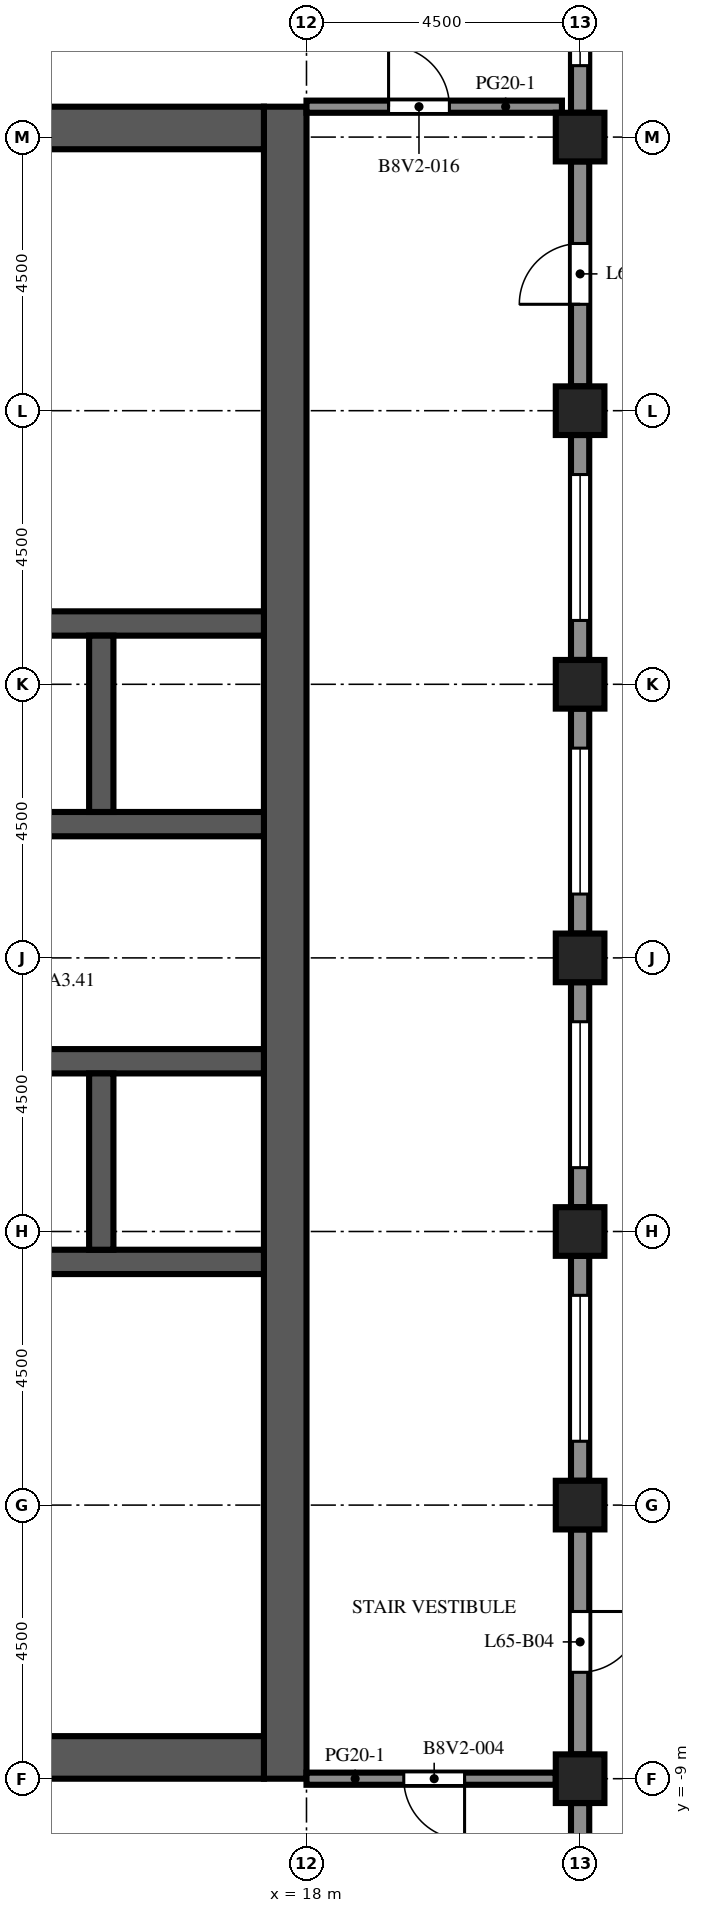
"""IFC4 building model, lengths in metres.
Left out: names, types, materials, properties, quantities, classifications, styles, units other than length and angle.
Written with IfcOpenShell. Run it as: python <this file> out.ifc"""

import sys

from ifc_helpers import new_model, si_unit, direction, frame, frame_2d, origin, origin_2d, place, context, subcontext, project, spatial, rectangle, extrude, element, fill, save


model = new_model("IFC4")
c1 = context("Model", 3, precision=1e-05, world=origin(), true_north=direction((0.0, 1.0)))
c2 = subcontext(c1, "Body", "Model", "MODEL_VIEW")
j1 = project(units=[si_unit("LENGTHUNIT", "METRE"), si_unit("PLANEANGLEUNIT", "RADIAN")], contexts=[c1])
p1 = place(None, origin())
s1 = spatial("IfcSite", under=j1, at=p1, CompositionType="ELEMENT")
p2 = place(p1, origin())
s2 = spatial("IfcBuilding", under=s1, at=p2, CompositionType="ELEMENT")
p3 = place(p2, frame((0.0, 0.0, 286.8)))
s3 = spatial("IfcBuildingStorey", under=s2, at=p3, CompositionType="ELEMENT", Elevation=286.8)
for number, where, z_axis, x_axis in (
    (1, (22.5, -9.0, 0.0), (0.0, 0.0, 1.0), (1.0, 0.0, 0.0)),
    (2, (22.5, -4.5, 0.0), (0.0, 0.0, 1.0), (1.0, 0.0, 0.0)),
    (3, (22.5, 0.0, 0.0), (0.0, 0.0, 1.0), (1.0, 0.0, 0.0)),
    (4, (22.5, 4.5, 0.0), (0.0, 0.0, 1.0), (1.0, 0.0, 0.0)),
    (5, (22.5, 9.0, 0.0), (0.0, 0.0, 1.0), (1.0, 0.0, 0.0)),
    (6, (22.5, 13.5, 0.0), (0.0, 0.0, 1.0), (1.0, 0.0, 0.0)),
    (7, (22.5, 18.0, 0.0), (0.0, 0.0, 1.0), (1.0, 0.0, 0.0)),
):
    element("IfcColumn", number, at=place(p3, frame(where, z_axis=z_axis, x_axis=x_axis)), inside=s3, PredefinedType="COLUMN", context=c2, shape_type="SweptSolid", body=[
        extrude(rectangle(XDim=0.8, YDim=0.8, at=origin_2d()), origin(), (0.0, 0.0, 1.0), 4.1),
    ])
p4 = place(p3, frame((17.65, -9.0, 0.0), z_axis=(0.0, 0.0, 1.0), x_axis=(0.0, 1.0, 0.0)))
e8 = element("IfcWall", 8, at=p4, inside=s3, PredefinedType="SHEAR", context=c2, shape_type="SweptSolid", body=[
    extrude(rectangle(XDim=27.5, YDim=0.7, at=frame_2d((13.75, 0.0))), origin(), (0.0, 0.0, 1.0), 4.1),
])
p5 = place(p4, frame((12.55, 0.0, 0.0)))
e9 = element("IfcOpeningElement", 9, at=p5, cuts=e8, PredefinedType="OPENING", context=c2, shape_type="SweptSolid", body=[
    extrude(rectangle(XDim=2.4, YDim=2.4, at=frame_2d((1.2, 1.2))), frame((0.0, 0.36, 0.0), z_axis=(0.0, -1.0, 0.0), x_axis=(1.0, 0.0, 0.0)), (0.0, 0.0, 1.0), 0.72),
])
p6 = place(p4, frame((6.825, 0.0, 0.0)))
e10 = element("IfcOpeningElement", 10, at=p6, cuts=e8, PredefinedType="OPENING", context=c2, shape_type="SweptSolid", body=[
    extrude(rectangle(XDim=1.2, YDim=2.1, at=frame_2d((0.6, 1.05))), frame((0.0, 0.36, 0.0), z_axis=(0.0, -1.0, 0.0), x_axis=(1.0, 0.0, 0.0)), (0.0, 0.0, 1.0), 0.72),
])
p7 = place(p4, frame((19.475, 0.0, 0.0)))
e11 = element("IfcOpeningElement", 11, at=p7, cuts=e8, PredefinedType="OPENING", context=c2, shape_type="SweptSolid", body=[
    extrude(rectangle(XDim=1.2, YDim=2.1, at=frame_2d((0.6, 1.05))), frame((0.0, 0.36, 0.0), z_axis=(0.0, -1.0, 0.0), x_axis=(1.0, 0.0, 0.0)), (0.0, 0.0, 1.0), 0.72),
])
for number, where, z_axis, x_axis in (
    (12, (6.7, -8.65, 0.0), (0.0, 0.0, 1.0), (1.0, 0.0, 0.0)),
    (13, (6.7, 18.15, 0.0), (0.0, 0.0, 1.0), (1.0, 0.0, 0.0)),
):
    element("IfcWall", number, at=place(p3, frame(where, z_axis=z_axis, x_axis=x_axis)), inside=s3, PredefinedType="SHEAR", context=c2, shape_type="SweptSolid", body=[
        extrude(rectangle(XDim=10.6, YDim=0.7, at=frame_2d((5.3, 0.0))), origin(), (0.0, 0.0, 1.0), 4.1),
    ])
p8 = place(p3, frame((6.7, -0.5, 0.0), z_axis=(0.0, 0.0, 1.0), x_axis=(1.0, 0.0, 0.0)))
e14 = element("IfcWall", 14, at=p8, inside=s3, PredefinedType="SHEAR", context=c2, shape_type="SweptSolid", body=[
    extrude(rectangle(XDim=10.6, YDim=0.4, at=frame_2d((5.3, 0.0))), origin(), (0.0, 0.0, 1.0), 4.1),
])
p9 = place(p3, frame((6.7, 2.8, 0.0), z_axis=(0.0, 0.0, 1.0), x_axis=(1.0, 0.0, 0.0)))
e15 = element("IfcWall", 15, at=p9, inside=s3, PredefinedType="SHEAR", context=c2, shape_type="SweptSolid", body=[
    extrude(rectangle(XDim=10.6, YDim=0.4, at=frame_2d((5.3, 0.0))), origin(), (0.0, 0.0, 1.0), 4.1),
])
p10 = place(p9, frame((0.688, 0.0, 0.0)))
e16 = element("IfcOpeningElement", 16, at=p10, cuts=e15, PredefinedType="OPENING", context=c2, shape_type="SweptSolid", body=[
    extrude(rectangle(XDim=1.1, YDim=2.1, at=frame_2d((0.55, 1.05))), frame((0.0, 0.21, 0.0), z_axis=(0.0, -1.0, 0.0), x_axis=(1.0, 0.0, 0.0)), (0.0, 0.0, 1.0), 0.42),
])
p11 = place(p9, frame((3.438, 0.0, 0.0)))
e17 = element("IfcOpeningElement", 17, at=p11, cuts=e15, PredefinedType="OPENING", context=c2, shape_type="SweptSolid", body=[
    extrude(rectangle(XDim=1.1, YDim=2.1, at=frame_2d((0.55, 1.05))), frame((0.0, 0.21, 0.0), z_axis=(0.0, -1.0, 0.0), x_axis=(1.0, 0.0, 0.0)), (0.0, 0.0, 1.0), 0.42),
])
p12 = place(p9, frame((6.113, 0.0, 0.0)))
e18 = element("IfcOpeningElement", 18, at=p12, cuts=e15, PredefinedType="OPENING", context=c2, shape_type="SweptSolid", body=[
    extrude(rectangle(XDim=1.0, YDim=2.1, at=frame_2d((0.5, 1.05))), frame((0.0, 0.21, 0.0), z_axis=(0.0, -1.0, 0.0), x_axis=(1.0, 0.0, 0.0)), (0.0, 0.0, 1.0), 0.42),
])
p13 = place(p9, frame((8.863, 0.0, 0.0)))
e19 = element("IfcOpeningElement", 19, at=p13, cuts=e15, PredefinedType="OPENING", context=c2, shape_type="SweptSolid", body=[
    extrude(rectangle(XDim=1.0, YDim=2.1, at=frame_2d((0.5, 1.05))), frame((0.0, 0.21, 0.0), z_axis=(0.0, -1.0, 0.0), x_axis=(1.0, 0.0, 0.0)), (0.0, 0.0, 1.0), 0.42),
])
p14 = place(p3, frame((6.7, 6.7, 0.0), z_axis=(0.0, 0.0, 1.0), x_axis=(1.0, 0.0, 0.0)))
e20 = element("IfcWall", 20, at=p14, inside=s3, PredefinedType="SHEAR", context=c2, shape_type="SweptSolid", body=[
    extrude(rectangle(XDim=10.6, YDim=0.4, at=frame_2d((5.3, 0.0))), origin(), (0.0, 0.0, 1.0), 4.1),
])
p15 = place(p14, frame((3.438, 0.0, 0.0)))
e21 = element("IfcOpeningElement", 21, at=p15, cuts=e20, PredefinedType="OPENING", context=c2, shape_type="SweptSolid", body=[
    extrude(rectangle(XDim=1.1, YDim=2.1, at=frame_2d((0.55, 1.05))), frame((0.0, 0.21, 0.0), z_axis=(0.0, -1.0, 0.0), x_axis=(1.0, 0.0, 0.0)), (0.0, 0.0, 1.0), 0.42),
])
p16 = place(p14, frame((6.062, 0.0, 0.0)))
e22 = element("IfcOpeningElement", 22, at=p16, cuts=e20, PredefinedType="OPENING", context=c2, shape_type="SweptSolid", body=[
    extrude(rectangle(XDim=1.1, YDim=2.1, at=frame_2d((0.55, 1.05))), frame((0.0, 0.21, 0.0), z_axis=(0.0, -1.0, 0.0), x_axis=(1.0, 0.0, 0.0)), (0.0, 0.0, 1.0), 0.42),
])
p17 = place(p14, frame((8.812, 0.0, 0.0)))
e23 = element("IfcOpeningElement", 23, at=p17, cuts=e20, PredefinedType="OPENING", context=c2, shape_type="SweptSolid", body=[
    extrude(rectangle(XDim=1.1, YDim=2.1, at=frame_2d((0.55, 1.05))), frame((0.0, 0.21, 0.0), z_axis=(0.0, -1.0, 0.0), x_axis=(1.0, 0.0, 0.0)), (0.0, 0.0, 1.0), 0.42),
])
p18 = place(p14, frame((0.738, 0.0, 0.0)))
e24 = element("IfcOpeningElement", 24, at=p18, cuts=e20, PredefinedType="OPENING", context=c2, shape_type="SweptSolid", body=[
    extrude(rectangle(XDim=1.0, YDim=2.1, at=frame_2d((0.5, 1.05))), frame((0.0, 0.21, 0.0), z_axis=(0.0, -1.0, 0.0), x_axis=(1.0, 0.0, 0.0)), (0.0, 0.0, 1.0), 0.42),
])
p19 = place(p3, frame((6.7, 10.0, 0.0), z_axis=(0.0, 0.0, 1.0), x_axis=(1.0, 0.0, 0.0)))
e25 = element("IfcWall", 25, at=p19, inside=s3, PredefinedType="SHEAR", context=c2, shape_type="SweptSolid", body=[
    extrude(rectangle(XDim=10.6, YDim=0.4, at=frame_2d((5.3, 0.0))), origin(), (0.0, 0.0, 1.0), 4.1),
])
for number, where, z_axis, x_axis in (
    (26, (14.625, -0.3, 0.0), (0.0, 0.0, 1.0), (0.0, 1.0, 0.0)),
    (27, (14.625, 6.9, 0.0), (0.0, 0.0, 1.0), (0.0, 1.0, 0.0)),
):
    element("IfcWall", number, at=place(p3, frame(where, z_axis=z_axis, x_axis=x_axis)), inside=s3, PredefinedType="SHEAR", context=c2, shape_type="SweptSolid", body=[
        extrude(rectangle(XDim=2.9, YDim=0.4, at=frame_2d((1.45, 0.0))), origin(), (0.0, 0.0, 1.0), 4.1),
    ])
p20 = place(p3, frame((22.5, -9.4, 0.0), z_axis=(0.0, 0.0, 1.0), x_axis=(0.0, -1.0, 0.0)))
e28 = element("IfcWall", 28, at=p20, inside=s3, PredefinedType="SOLIDWALL", context=c2, shape_type="SweptSolid", body=[
    extrude(rectangle(XDim=3.7, YDim=0.3, at=frame_2d((1.85, 0.0))), origin(), (0.0, 0.0, 1.0), 2.85),
])
p21 = place(p20, frame((0.65, 0.0, 0.8)))
e29 = element("IfcOpeningElement", 29, at=p21, cuts=e28, PredefinedType="OPENING", context=c2, shape_type="SweptSolid", body=[
    extrude(rectangle(XDim=2.4, YDim=1.7, at=frame_2d((1.2, 0.85))), frame((0.0, 0.16, 0.0), z_axis=(0.0, -1.0, 0.0), x_axis=(1.0, 0.0, 0.0)), (0.0, 0.0, 1.0), 0.32),
])
p22 = place(p3, frame((22.5, -4.9, 0.0), z_axis=(0.0, 0.0, 1.0), x_axis=(0.0, -1.0, 0.0)))
e30 = element("IfcWall", 30, at=p22, inside=s3, PredefinedType="SOLIDWALL", context=c2, shape_type="SweptSolid", body=[
    extrude(rectangle(XDim=3.7, YDim=0.3, at=frame_2d((1.85, 0.0))), origin(), (0.0, 0.0, 1.0), 2.85),
])
p23 = place(p22, frame((1.35, 0.0, 0.0)))
e31 = element("IfcOpeningElement", 31, at=p23, cuts=e30, PredefinedType="OPENING", context=c2, shape_type="SweptSolid", body=[
    extrude(rectangle(XDim=1.0, YDim=2.2, at=frame_2d((0.5, 1.1))), frame((0.0, 0.16, 0.0), z_axis=(0.0, -1.0, 0.0), x_axis=(1.0, 0.0, 0.0)), (0.0, 0.0, 1.0), 0.32),
])
p24 = place(p3, frame((22.5, -0.4, 0.0), z_axis=(0.0, 0.0, 1.0), x_axis=(0.0, -1.0, 0.0)))
e32 = element("IfcWall", 32, at=p24, inside=s3, PredefinedType="SOLIDWALL", context=c2, shape_type="SweptSolid", body=[
    extrude(rectangle(XDim=3.7, YDim=0.3, at=frame_2d((1.85, 0.0))), origin(), (0.0, 0.0, 1.0), 2.85),
])
p25 = place(p24, frame((0.65, 0.0, 0.8)))
e33 = element("IfcOpeningElement", 33, at=p25, cuts=e32, PredefinedType="OPENING", context=c2, shape_type="SweptSolid", body=[
    extrude(rectangle(XDim=2.4, YDim=1.7, at=frame_2d((1.2, 0.85))), frame((0.0, 0.16, 0.0), z_axis=(0.0, -1.0, 0.0), x_axis=(1.0, 0.0, 0.0)), (0.0, 0.0, 1.0), 0.32),
])
p26 = place(p3, frame((22.5, 4.1, 0.0), z_axis=(0.0, 0.0, 1.0), x_axis=(0.0, -1.0, 0.0)))
e34 = element("IfcWall", 34, at=p26, inside=s3, PredefinedType="SOLIDWALL", context=c2, shape_type="SweptSolid", body=[
    extrude(rectangle(XDim=3.7, YDim=0.3, at=frame_2d((1.85, 0.0))), origin(), (0.0, 0.0, 1.0), 2.85),
])
p27 = place(p26, frame((0.65, 0.0, 0.8)))
e35 = element("IfcOpeningElement", 35, at=p27, cuts=e34, PredefinedType="OPENING", context=c2, shape_type="SweptSolid", body=[
    extrude(rectangle(XDim=2.4, YDim=1.7, at=frame_2d((1.2, 0.85))), frame((0.0, 0.16, 0.0), z_axis=(0.0, -1.0, 0.0), x_axis=(1.0, 0.0, 0.0)), (0.0, 0.0, 1.0), 0.32),
])
p28 = place(p3, frame((22.5, 8.6, 0.0), z_axis=(0.0, 0.0, 1.0), x_axis=(0.0, -1.0, 0.0)))
e36 = element("IfcWall", 36, at=p28, inside=s3, PredefinedType="SOLIDWALL", context=c2, shape_type="SweptSolid", body=[
    extrude(rectangle(XDim=3.7, YDim=0.3, at=frame_2d((1.85, 0.0))), origin(), (0.0, 0.0, 1.0), 2.85),
])
p29 = place(p28, frame((0.65, 0.0, 0.8)))
e37 = element("IfcOpeningElement", 37, at=p29, cuts=e36, PredefinedType="OPENING", context=c2, shape_type="SweptSolid", body=[
    extrude(rectangle(XDim=2.4, YDim=1.7, at=frame_2d((1.2, 0.85))), frame((0.0, 0.16, 0.0), z_axis=(0.0, -1.0, 0.0), x_axis=(1.0, 0.0, 0.0)), (0.0, 0.0, 1.0), 0.32),
])
p30 = place(p3, frame((22.5, 13.1, 0.0), z_axis=(0.0, 0.0, 1.0), x_axis=(0.0, -1.0, 0.0)))
e38 = element("IfcWall", 38, at=p30, inside=s3, PredefinedType="SOLIDWALL", context=c2, shape_type="SweptSolid", body=[
    extrude(rectangle(XDim=3.7, YDim=0.3, at=frame_2d((1.85, 0.0))), origin(), (0.0, 0.0, 1.0), 2.85),
])
p31 = place(p30, frame((0.65, 0.0, 0.8)))
e39 = element("IfcOpeningElement", 39, at=p31, cuts=e38, PredefinedType="OPENING", context=c2, shape_type="SweptSolid", body=[
    extrude(rectangle(XDim=2.4, YDim=1.7, at=frame_2d((1.2, 0.85))), frame((0.0, 0.16, 0.0), z_axis=(0.0, -1.0, 0.0), x_axis=(1.0, 0.0, 0.0)), (0.0, 0.0, 1.0), 0.32),
])
p32 = place(p3, frame((22.5, 17.6, 0.0), z_axis=(0.0, 0.0, 1.0), x_axis=(0.0, -1.0, 0.0)))
e40 = element("IfcWall", 40, at=p32, inside=s3, PredefinedType="SOLIDWALL", context=c2, shape_type="SweptSolid", body=[
    extrude(rectangle(XDim=3.7, YDim=0.3, at=frame_2d((1.85, 0.0))), origin(), (0.0, 0.0, 1.0), 2.85),
])
p33 = place(p32, frame((1.35, 0.0, 0.0)))
e41 = element("IfcOpeningElement", 41, at=p33, cuts=e40, PredefinedType="OPENING", context=c2, shape_type="SweptSolid", body=[
    extrude(rectangle(XDim=1.0, YDim=2.2, at=frame_2d((0.5, 1.1))), frame((0.0, 0.16, 0.0), z_axis=(0.0, -1.0, 0.0), x_axis=(1.0, 0.0, 0.0)), (0.0, 0.0, 1.0), 0.32),
])
p34 = place(p3, frame((22.5, 22.1, 0.0), z_axis=(0.0, 0.0, 1.0), x_axis=(0.0, -1.0, 0.0)))
e42 = element("IfcWall", 42, at=p34, inside=s3, PredefinedType="SOLIDWALL", context=c2, shape_type="SweptSolid", body=[
    extrude(rectangle(XDim=3.7, YDim=0.3, at=frame_2d((1.85, 0.0))), origin(), (0.0, 0.0, 1.0), 2.85),
])
p35 = place(p34, frame((0.525, 0.0, 0.8)))
e43 = element("IfcOpeningElement", 43, at=p35, cuts=e42, PredefinedType="OPENING", context=c2, shape_type="SweptSolid", body=[
    extrude(rectangle(XDim=2.4, YDim=1.7, at=frame_2d((1.2, 0.85))), frame((0.0, 0.16, 0.0), z_axis=(0.0, -1.0, 0.0), x_axis=(1.0, 0.0, 0.0)), (0.0, 0.0, 1.0), 0.32),
])
p36 = place(p3, frame((22.1, -9.0, 0.0), z_axis=(0.0, 0.0, 1.0), x_axis=(-1.0, 0.0, 0.0)))
e44 = element("IfcWall", 44, at=p36, inside=s3, PredefinedType="PARTITIONING", context=c2, shape_type="SweptSolid", body=[
    extrude(rectangle(XDim=4.1, YDim=0.2, at=frame_2d((2.05, 0.0))), origin(), (0.0, 0.0, 1.0), 3.65),
])
p37 = place(p36, frame((1.5, 0.0, 0.0)))
e45 = element("IfcOpeningElement", 45, at=p37, cuts=e44, PredefinedType="OPENING", context=c2, shape_type="SweptSolid", body=[
    extrude(rectangle(XDim=1.0, YDim=2.1, at=frame_2d((0.5, 1.05))), frame((0.0, 0.11, 0.0), z_axis=(0.0, -1.0, 0.0), x_axis=(1.0, 0.0, 0.0)), (0.0, 0.0, 1.0), 0.22),
])
p38 = place(p3, frame((18.0, 18.5, 0.0), z_axis=(0.0, 0.0, 1.0), x_axis=(1.0, 0.0, 0.0)))
e46 = element("IfcWall", 46, at=p38, inside=s3, PredefinedType="PARTITIONING", context=c2, shape_type="SweptSolid", body=[
    extrude(rectangle(XDim=4.201, YDim=0.2, at=frame_2d((2.101, 0.0))), origin(), (0.0, 0.0, 1.0), 3.65),
])
p39 = place(p38, frame((1.35, 0.0, 0.0)))
e47 = element("IfcOpeningElement", 47, at=p39, cuts=e46, PredefinedType="OPENING", context=c2, shape_type="SweptSolid", body=[
    extrude(rectangle(XDim=1.0, YDim=2.1, at=frame_2d((0.5, 1.05))), frame((0.0, 0.11, 0.0), z_axis=(0.0, -1.0, 0.0), x_axis=(1.0, 0.0, 0.0)), (0.0, 0.0, 1.0), 0.22),
])
p40 = place(p23, origin())
e48 = element("IfcDoor", 48, at=p40, inside=s3, OperationType="SINGLE_SWING_LEFT", PredefinedType="DOOR", context=c2, shape_type="SweptSolid", body=[
    extrude(rectangle(XDim=1.0, YDim=2.2, at=frame_2d((0.5, 1.1))), frame((0.0, 0.025, 0.0), z_axis=(0.0, -1.0, 0.0), x_axis=(1.0, 0.0, 0.0)), (0.0, 0.0, 1.0), 0.05),
])
fill(e31, e48)
p41 = place(p25, origin())
e49 = element("IfcWindow", 49, at=p41, inside=s3, PartitioningType="SINGLE_PANEL", PredefinedType="WINDOW", context=c2, shape_type="SweptSolid", body=[
    extrude(rectangle(XDim=2.4, YDim=1.7, at=frame_2d((1.2, 0.85))), frame((0.0, 0.03, 0.0), z_axis=(0.0, -1.0, 0.0), x_axis=(1.0, 0.0, 0.0)), (0.0, 0.0, 1.0), 0.06),
])
fill(e33, e49)
p42 = place(p27, origin())
e50 = element("IfcWindow", 50, at=p42, inside=s3, PartitioningType="SINGLE_PANEL", PredefinedType="WINDOW", context=c2, shape_type="SweptSolid", body=[
    extrude(rectangle(XDim=2.4, YDim=1.7, at=frame_2d((1.2, 0.85))), frame((0.0, 0.03, 0.0), z_axis=(0.0, -1.0, 0.0), x_axis=(1.0, 0.0, 0.0)), (0.0, 0.0, 1.0), 0.06),
])
fill(e35, e50)
p43 = place(p29, origin())
e51 = element("IfcWindow", 51, at=p43, inside=s3, PartitioningType="SINGLE_PANEL", PredefinedType="WINDOW", context=c2, shape_type="SweptSolid", body=[
    extrude(rectangle(XDim=2.4, YDim=1.7, at=frame_2d((1.2, 0.85))), frame((0.0, 0.03, 0.0), z_axis=(0.0, -1.0, 0.0), x_axis=(1.0, 0.0, 0.0)), (0.0, 0.0, 1.0), 0.06),
])
fill(e37, e51)
p44 = place(p31, origin())
e52 = element("IfcWindow", 52, at=p44, inside=s3, PartitioningType="SINGLE_PANEL", PredefinedType="WINDOW", context=c2, shape_type="SweptSolid", body=[
    extrude(rectangle(XDim=2.4, YDim=1.7, at=frame_2d((1.2, 0.85))), frame((0.0, 0.03, 0.0), z_axis=(0.0, -1.0, 0.0), x_axis=(1.0, 0.0, 0.0)), (0.0, 0.0, 1.0), 0.06),
])
fill(e39, e52)
p45 = place(p33, origin())
e53 = element("IfcDoor", 53, at=p45, inside=s3, OperationType="SINGLE_SWING_RIGHT", PredefinedType="DOOR", context=c2, shape_type="SweptSolid", body=[
    extrude(rectangle(XDim=1.0, YDim=2.2, at=frame_2d((0.5, 1.1))), frame((0.0, 0.025, 0.0), z_axis=(0.0, -1.0, 0.0), x_axis=(1.0, 0.0, 0.0)), (0.0, 0.0, 1.0), 0.05),
])
fill(e41, e53)
p46 = place(p35, origin())
e54 = element("IfcWindow", 54, at=p46, inside=s3, PartitioningType="SINGLE_PANEL", PredefinedType="WINDOW", context=c2, shape_type="SweptSolid", body=[
    extrude(rectangle(XDim=2.4, YDim=1.7, at=frame_2d((1.2, 0.85))), frame((0.0, 0.03, 0.0), z_axis=(0.0, -1.0, 0.0), x_axis=(1.0, 0.0, 0.0)), (0.0, 0.0, 1.0), 0.06),
])
fill(e43, e54)
p47 = place(p16, origin())
e55 = element("IfcDoor", 55, at=p47, inside=s3, OperationType="DOUBLE_DOOR_SLIDING", PredefinedType="DOOR", context=c2, shape_type="SweptSolid", body=[
    extrude(rectangle(XDim=1.1, YDim=2.1, at=frame_2d((0.55, 1.05))), frame((0.0, 0.025, 0.0), z_axis=(0.0, -1.0, 0.0), x_axis=(1.0, 0.0, 0.0)), (0.0, 0.0, 1.0), 0.05),
])
fill(e22, e55)
p48 = place(p17, origin())
e56 = element("IfcDoor", 56, at=p48, inside=s3, OperationType="DOUBLE_DOOR_SLIDING", PredefinedType="DOOR", context=c2, shape_type="SweptSolid", body=[
    extrude(rectangle(XDim=1.1, YDim=2.1, at=frame_2d((0.55, 1.05))), frame((0.0, 0.025, 0.0), z_axis=(0.0, -1.0, 0.0), x_axis=(1.0, 0.0, 0.0)), (0.0, 0.0, 1.0), 0.05),
])
fill(e23, e56)
p49 = place(p5, origin())
e57 = element("IfcDoor", 57, at=p49, inside=s3, OperationType="DOUBLE_DOOR_DOUBLE_SWING", PredefinedType="DOOR", context=c2, shape_type="SweptSolid", body=[
    extrude(rectangle(XDim=2.4, YDim=2.4, at=frame_2d((1.2, 1.2))), frame((0.0, 0.025, 0.0), z_axis=(0.0, -1.0, 0.0), x_axis=(1.0, 0.0, 0.0)), (0.0, 0.0, 1.0), 0.05),
])
fill(e9, e57)
p50 = place(p6, frame((1.2, 0.0, 0.0), z_axis=(0.0, 0.0, 1.0), x_axis=(-1.0, 0.0, 0.0)))
e58 = element("IfcDoor", 58, at=p50, inside=s3, OperationType="SINGLE_SWING_LEFT", PredefinedType="DOOR", context=c2, shape_type="SweptSolid", body=[
    extrude(rectangle(XDim=1.2, YDim=2.1, at=frame_2d((0.6, 1.05))), frame((0.0, 0.025, 0.0), z_axis=(0.0, -1.0, 0.0), x_axis=(1.0, 0.0, 0.0)), (0.0, 0.0, 1.0), 0.05),
])
fill(e10, e58)
p51 = place(p7, frame((1.2, 0.0, 0.0), z_axis=(0.0, 0.0, 1.0), x_axis=(-1.0, 0.0, 0.0)))
e59 = element("IfcDoor", 59, at=p51, inside=s3, OperationType="SINGLE_SWING_LEFT", PredefinedType="DOOR", context=c2, shape_type="SweptSolid", body=[
    extrude(rectangle(XDim=1.2, YDim=2.1, at=frame_2d((0.6, 1.05))), frame((0.0, 0.025, 0.0), z_axis=(0.0, -1.0, 0.0), x_axis=(1.0, 0.0, 0.0)), (0.0, 0.0, 1.0), 0.05),
])
fill(e11, e59)
p52 = place(p13, origin())
e60 = element("IfcDoor", 60, at=p52, inside=s3, OperationType="SINGLE_SWING_RIGHT", PredefinedType="DOOR", context=c2, shape_type="SweptSolid", body=[
    extrude(rectangle(XDim=1.0, YDim=2.1, at=frame_2d((0.5, 1.05))), frame((0.0, 0.025, 0.0), z_axis=(0.0, -1.0, 0.0), x_axis=(1.0, 0.0, 0.0)), (0.0, 0.0, 1.0), 0.05),
])
fill(e19, e60)
p53 = place(p37, origin())
e61 = element("IfcDoor", 61, at=p53, inside=s3, OperationType="SINGLE_SWING_LEFT", PredefinedType="DOOR", context=c2, shape_type="SweptSolid", body=[
    extrude(rectangle(XDim=1.0, YDim=2.1, at=frame_2d((0.5, 1.05))), frame((0.0, 0.025, 0.0), z_axis=(0.0, -1.0, 0.0), x_axis=(1.0, 0.0, 0.0)), (0.0, 0.0, 1.0), 0.05),
])
fill(e45, e61)
p54 = place(p39, origin())
e62 = element("IfcDoor", 62, at=p54, inside=s3, OperationType="SINGLE_SWING_LEFT", PredefinedType="DOOR", context=c2, shape_type="SweptSolid", body=[
    extrude(rectangle(XDim=1.0, YDim=2.1, at=frame_2d((0.5, 1.05))), frame((0.0, 0.025, 0.0), z_axis=(0.0, -1.0, 0.0), x_axis=(1.0, 0.0, 0.0)), (0.0, 0.0, 1.0), 0.05),
])
fill(e47, e62)
save(model, sys.argv[1])
